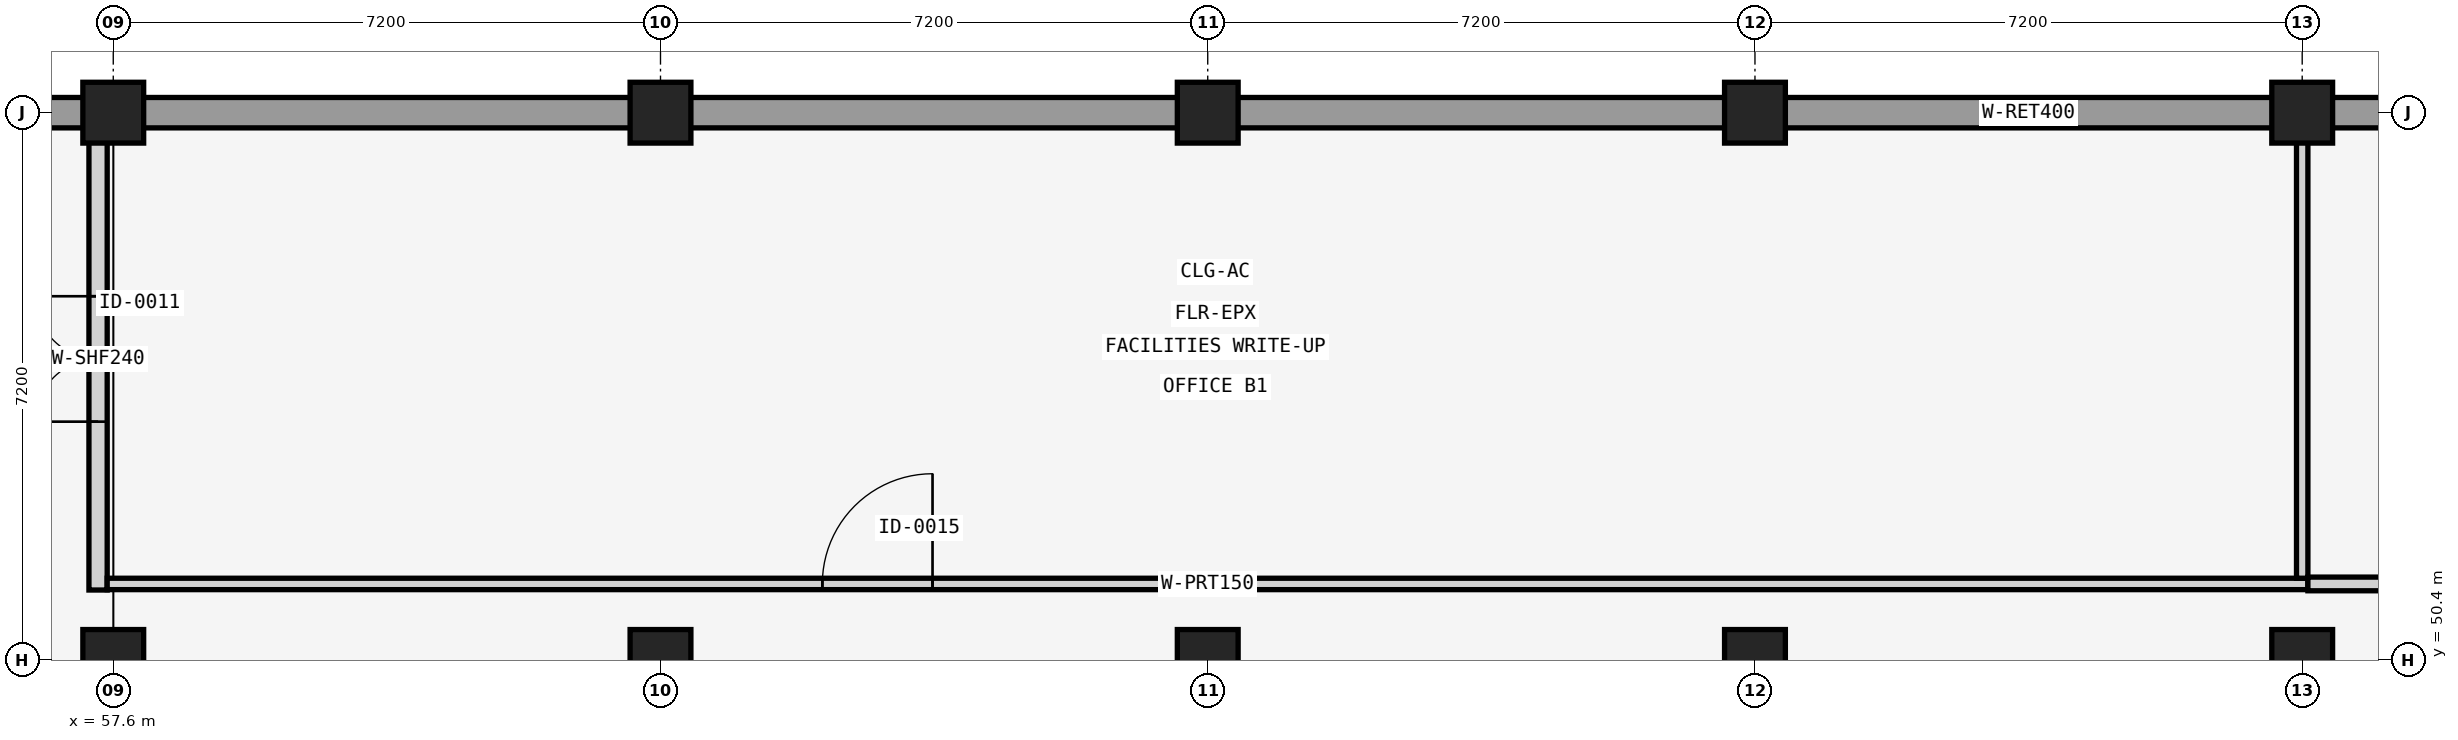
"""IFC4 building model, lengths in metres.
Left out: names, types, materials, properties, quantities, classifications, styles, units other than length and angle.
Written with IfcOpenShell. Run it as: python <this file> out.ifc"""

import sys

from ifc_helpers import new_model, si_unit, direction, frame, frame_2d, origin, origin_2d, place, context, subcontext, project, spatial, rectangle, extrude, element, fill, save


model = new_model("IFC4")
c1 = context("Model", 3, precision=1e-05, world=origin(), true_north=direction((0.0, 1.0)))
c2 = subcontext(c1, "Body", "Model", "MODEL_VIEW")
j1 = project(units=[si_unit("LENGTHUNIT", "METRE"), si_unit("PLANEANGLEUNIT", "RADIAN")], contexts=[c1])
p1 = place(None, origin())
s1 = spatial("IfcSite", under=j1, at=p1, CompositionType="ELEMENT")
p2 = place(p1, origin())
s2 = spatial("IfcBuilding", under=s1, at=p2, CompositionType="ELEMENT")
p3 = place(p2, frame((0.0, 0.0, -4.8)))
s3 = spatial("IfcBuildingStorey", under=s2, at=p3, CompositionType="ELEMENT", Elevation=-4.8)
for number, where, z_axis, x_axis in (
    (1, (57.6, 50.4, 0.0), (0.0, 0.0, 1.0), (1.0, 0.0, 0.0)),
    (2, (57.6, 57.6, 0.0), (0.0, 0.0, 1.0), (1.0, 0.0, 0.0)),
    (3, (64.8, 50.4, 0.0), (0.0, 0.0, 1.0), (1.0, 0.0, 0.0)),
    (4, (64.8, 57.6, 0.0), (0.0, 0.0, 1.0), (1.0, 0.0, 0.0)),
    (5, (72.0, 50.4, 0.0), (0.0, 0.0, 1.0), (1.0, 0.0, 0.0)),
    (6, (72.0, 57.6, 0.0), (0.0, 0.0, 1.0), (1.0, 0.0, 0.0)),
    (7, (79.2, 50.4, 0.0), (0.0, 0.0, 1.0), (1.0, 0.0, 0.0)),
    (8, (79.2, 57.6, 0.0), (0.0, 0.0, 1.0), (1.0, 0.0, 0.0)),
    (9, (86.4, 50.4, 0.0), (0.0, 0.0, 1.0), (1.0, 0.0, 0.0)),
    (10, (86.4, 57.6, 0.0), (0.0, 0.0, 1.0), (1.0, 0.0, 0.0)),
):
    element("IfcColumn", number, at=place(p3, frame(where, z_axis=z_axis, x_axis=x_axis)), inside=s3, PredefinedType="COLUMN", context=c2, shape_type="SweptSolid", body=[
        extrude(rectangle(XDim=0.8, YDim=0.8, at=origin_2d()), origin(), (0.0, 0.0, 1.0), 4.8),
    ])
p4 = place(p3, frame((43.2, 57.6, 0.0), z_axis=(0.0, 0.0, 1.0), x_axis=(1.0, 0.0, 0.0)))
e11 = element("IfcWall", 11, at=p4, inside=s3, PredefinedType="STANDARD", context=c2, shape_type="SweptSolid", body=[
    extrude(rectangle(XDim=79.2, YDim=0.4, at=frame_2d((39.6, 0.0))), origin(), (0.0, 0.0, 1.0), 4.4),
])
p5 = place(p3, frame((57.4, 51.32, 0.0), z_axis=(0.0, 0.0, 1.0), x_axis=(0.0, 1.0, 0.0)))
e12 = element("IfcWall", 12, at=p5, inside=s3, PredefinedType="SOLIDWALL", context=c2, shape_type="SweptSolid", body=[
    extrude(rectangle(XDim=6.08, YDim=0.24, at=frame_2d((3.04, 0.0))), origin(), (0.0, 0.0, 1.0), 3.7),
])
p6 = place(p5, frame((2.215, 0.0, 0.0)))
e13 = element("IfcOpeningElement", 13, at=p6, cuts=e12, PredefinedType="OPENING", context=c2, shape_type="SweptSolid", body=[
    extrude(rectangle(XDim=1.65, YDim=2.3, at=frame_2d((0.825, 1.15))), frame((0.0, 0.13, 0.0), z_axis=(0.0, -1.0, 0.0), x_axis=(1.0, 0.0, 0.0)), (0.0, 0.0, 1.0), 0.26),
])
p7 = place(p3, frame((57.52, 51.4, 0.0), z_axis=(0.0, 0.0, 1.0), x_axis=(1.0, 0.0, 0.0)))
e14 = element("IfcWall", 14, at=p7, inside=s3, PredefinedType="PARTITIONING", context=c2, shape_type="SweptSolid", body=[
    extrude(rectangle(XDim=28.955, YDim=0.15, at=frame_2d((14.478, 0.0))), origin(), (0.0, 0.0, 1.0), 3.7),
])
p8 = place(p7, frame((9.409, 0.0, 0.0)))
e15 = element("IfcOpeningElement", 15, at=p8, cuts=e14, PredefinedType="OPENING", context=c2, shape_type="SweptSolid", body=[
    extrude(rectangle(XDim=1.45, YDim=2.2, at=frame_2d((0.725, 1.1))), frame((0.0, 0.085, 0.0), z_axis=(0.0, -1.0, 0.0), x_axis=(1.0, 0.0, 0.0)), (0.0, 0.0, 1.0), 0.17),
])
p9 = place(p3, frame((86.4, 51.475, 0.0), z_axis=(0.0, 0.0, 1.0), x_axis=(0.0, 1.0, 0.0)))
e16 = element("IfcWall", 16, at=p9, inside=s3, PredefinedType="PARTITIONING", context=c2, shape_type="SweptSolid", body=[
    extrude(rectangle(XDim=5.925, YDim=0.15, at=frame_2d((2.962, 0.0))), origin(), (0.0, 0.0, 1.0), 3.7),
])
p10 = place(p3, frame((86.475, 51.4, 0.0), z_axis=(0.0, 0.0, 1.0), x_axis=(1.0, 0.0, 0.0)))
e17 = element("IfcWall", 17, at=p10, inside=s3, PredefinedType="PARTITIONING", context=c2, shape_type="SweptSolid", body=[
    extrude(rectangle(XDim=35.815, YDim=0.18, at=frame_2d((17.907, 0.0))), origin(), (0.0, 0.0, 1.0), 3.7),
])
p11 = place(p10, frame((17.032, 0.0, 0.0)))
e18 = element("IfcOpeningElement", 18, at=p11, cuts=e17, PredefinedType="OPENING", context=c2, shape_type="SweptSolid", body=[
    extrude(rectangle(XDim=1.75, YDim=2.25, at=frame_2d((0.875, 1.125))), frame((0.0, 0.1, 0.0), z_axis=(0.0, -1.0, 0.0), x_axis=(1.0, 0.0, 0.0)), (0.0, 0.0, 1.0), 0.2),
])
p12 = place(p6, origin())
e19 = element("IfcDoor", 19, at=p12, inside=s3, OperationType="DOUBLE_DOOR_SINGLE_SWING", PredefinedType="DOOR", context=c2, shape_type="SweptSolid", body=[
    extrude(rectangle(XDim=1.65, YDim=2.3, at=frame_2d((0.825, 1.15))), frame((0.0, 0.025, 0.0), z_axis=(0.0, -1.0, 0.0), x_axis=(1.0, 0.0, 0.0)), (0.0, 0.0, 1.0), 0.05),
])
fill(e13, e19)
p13 = place(p8, origin())
e20 = element("IfcDoor", 20, at=p13, inside=s3, OperationType="SINGLE_SWING_RIGHT", PredefinedType="DOOR", context=c2, shape_type="SweptSolid", body=[
    extrude(rectangle(XDim=1.45, YDim=2.2, at=frame_2d((0.725, 1.1))), frame((0.0, 0.025, 0.0), z_axis=(0.0, -1.0, 0.0), x_axis=(1.0, 0.0, 0.0)), (0.0, 0.0, 1.0), 0.05),
])
fill(e15, e20)
save(model, sys.argv[1])
